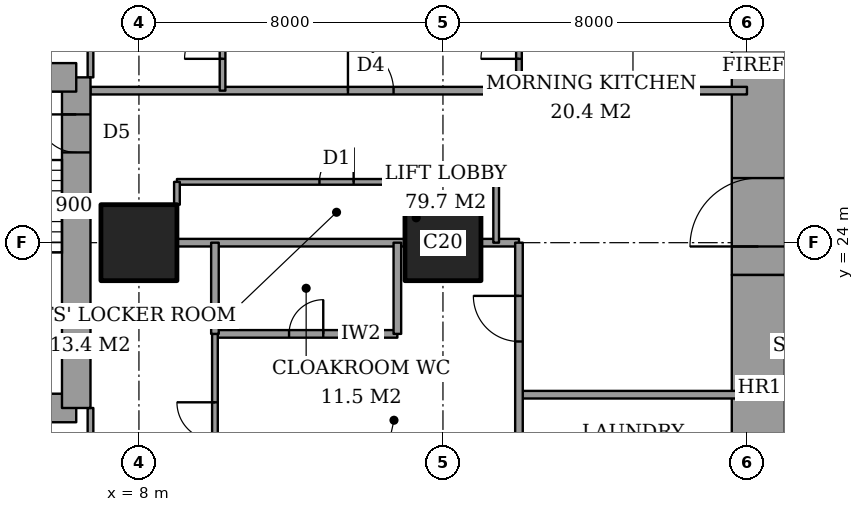
"""IFC4 building model, lengths in metres.
Left out: names, types, materials, properties, quantities, classifications, styles, units other than length and angle.
Written with IfcOpenShell. Run it as: python <this file> out.ifc"""

import sys

from ifc_helpers import new_model, si_unit, direction, frame, frame_2d, origin, origin_2d, place, context, subcontext, project, spatial, rectangle, extrude, element, fill, save


model = new_model("IFC4")
c1 = context("Model", 3, precision=1e-05, world=origin(), true_north=direction((0.0, 1.0)))
c2 = subcontext(c1, "Body", "Model", "MODEL_VIEW")
j1 = project(units=[si_unit("LENGTHUNIT", "METRE"), si_unit("PLANEANGLEUNIT", "RADIAN")], contexts=[c1])
p1 = place(None, origin())
s1 = spatial("IfcSite", under=j1, at=p1, CompositionType="ELEMENT")
p2 = place(p1, origin())
s2 = spatial("IfcBuilding", under=s1, at=p2, CompositionType="ELEMENT")
p3 = place(p2, frame((0.0, 0.0, 117.8)))
s3 = spatial("IfcBuildingStorey", under=s2, at=p3, CompositionType="ELEMENT", Elevation=117.8)
for number, where, z_axis, x_axis in (
    (1, (8.0, 24.0, 0.0), (0.0, 0.0, 1.0), (1.0, 0.0, 0.0)),
    (2, (16.0, 24.0, 0.0), (0.0, 0.0, 1.0), (1.0, 0.0, 0.0)),
):
    element("IfcColumn", number, at=place(p3, frame(where, z_axis=z_axis, x_axis=x_axis)), inside=s3, PredefinedType="COLUMN", context=c2, shape_type="SweptSolid", body=[
        extrude(rectangle(XDim=2.0, YDim=2.0, at=origin_2d()), origin(), (0.0, 0.0, 1.0), 3.6),
    ])
p4 = place(p3, frame((24.3, 13.0, 0.0), z_axis=(0.0, 0.0, 1.0), x_axis=(0.0, 1.0, 0.0)))
e3 = element("IfcWall", 3, at=p4, inside=s3, PredefinedType="SHEAR", context=c2, shape_type="SweptSolid", body=[
    extrude(rectangle(XDim=10.15, YDim=1.4, at=frame_2d((5.075, 0.0))), origin(), (0.0, 0.0, 1.0), 3.6),
])
p5 = place(p3, frame((24.3, 23.15, 0.0), z_axis=(0.0, 0.0, 1.0), x_axis=(0.0, 1.0, 0.0)))
e4 = element("IfcWall", 4, at=p5, inside=s3, PredefinedType="SHEAR", context=c2, shape_type="SweptSolid", body=[
    extrude(rectangle(XDim=11.85, YDim=1.4, at=frame_2d((5.925, 0.0))), origin(), (0.0, 0.0, 1.0), 3.6),
])
p6 = place(p5, frame((0.75, 0.0, 0.0)))
e5 = element("IfcOpeningElement", 5, at=p6, cuts=e4, PredefinedType="OPENING", context=c2, shape_type="SweptSolid", body=[
    extrude(rectangle(XDim=1.8, YDim=2.4, at=frame_2d((0.9, 1.2))), frame((0.0, 0.71, 0.0), z_axis=(0.0, -1.0, 0.0), x_axis=(1.0, 0.0, 0.0)), (0.0, 0.0, 1.0), 1.42),
])
p7 = place(p3, frame((1.9, 19.65, 0.0), z_axis=(0.0, 0.0, 1.0), x_axis=(1.0, 0.0, 0.0)))
e6 = element("IfcWall", 6, at=p7, inside=s3, PredefinedType="SHEAR", context=c2, shape_type="SweptSolid", body=[
    extrude(rectangle(XDim=4.45, YDim=0.75, at=frame_2d((2.225, 0.0))), origin(), (0.0, 0.0, 1.0), 3.6),
])
p8 = place(p3, frame((6.35, 19.65, 0.0), z_axis=(0.0, 0.0, 1.0), x_axis=(0.0, 1.0, 0.0)))
e7 = element("IfcWall", 7, at=p8, inside=s3, PredefinedType="SHEAR", context=c2, shape_type="SweptSolid", body=[
    extrude(rectangle(XDim=8.7, YDim=0.75, at=frame_2d((4.35, 0.0))), origin(), (0.0, 0.0, 1.0), 3.6),
])
p9 = place(p8, frame((6.725, 0.0, 0.0)))
e8 = element("IfcOpeningElement", 8, at=p9, cuts=e7, PredefinedType="OPENING", context=c2, shape_type="SweptSolid", body=[
    extrude(rectangle(XDim=1.0, YDim=2.1, at=frame_2d((0.5, 1.05))), frame((0.0, 0.385, 0.0), z_axis=(0.0, -1.0, 0.0), x_axis=(1.0, 0.0, 0.0)), (0.0, 0.0, 1.0), 0.77),
])
p10 = place(p3, frame((6.35, 28.35, 0.0), z_axis=(0.0, 0.0, 1.0), x_axis=(-1.0, 0.0, 0.0)))
e9 = element("IfcWall", 9, at=p10, inside=s3, PredefinedType="SHEAR", context=c2, shape_type="SweptSolid", body=[
    extrude(rectangle(XDim=4.45, YDim=0.75, at=frame_2d((2.225, 0.0))), origin(), (0.0, 0.0, 1.0), 3.6),
])
p11 = place(p3, frame((18.0, 20.0, 0.0), z_axis=(0.0, 0.0, 1.0), x_axis=(1.0, 0.0, 0.0)))
e10 = element("IfcWall", 10, at=p11, inside=s3, PredefinedType="PARTITIONING", context=c2, shape_type="SweptSolid", body=[
    extrude(rectangle(XDim=6.0, YDim=0.2, at=frame_2d((3.0, 0.0))), origin(), (0.0, 0.0, 1.0), 3.35),
])
p12 = place(p3, frame((10.0, 21.6, 0.0), z_axis=(0.0, 0.0, 1.0), x_axis=(1.0, 0.0, 0.0)))
e11 = element("IfcWall", 11, at=p12, inside=s3, PredefinedType="PARTITIONING", context=c2, shape_type="SweptSolid", body=[
    extrude(rectangle(XDim=4.8, YDim=0.2, at=frame_2d((2.4, 0.0))), origin(), (0.0, 0.0, 1.0), 3.35),
])
p13 = place(p12, frame((1.95, 0.0, 0.0)))
e12 = element("IfcOpeningElement", 12, at=p13, cuts=e11, PredefinedType="OPENING", context=c2, shape_type="SweptSolid", body=[
    extrude(rectangle(XDim=0.9, YDim=2.1, at=frame_2d((0.45, 1.05))), frame((0.0, 0.11, 0.0), z_axis=(0.0, -1.0, 0.0), x_axis=(1.0, 0.0, 0.0)), (0.0, 0.0, 1.0), 0.22),
])
p14 = place(p3, frame((9.0, 24.0, 0.0), z_axis=(0.0, 0.0, 1.0), x_axis=(1.0, 0.0, 0.0)))
e13 = element("IfcWall", 13, at=p14, inside=s3, PredefinedType="PARTITIONING", context=c2, shape_type="SweptSolid", body=[
    extrude(rectangle(XDim=6.0, YDim=0.2, at=frame_2d((3.0, 0.0))), origin(), (0.0, 0.0, 1.0), 3.35),
])
p15 = place(p3, frame((17.0, 24.0, 0.0), z_axis=(0.0, 0.0, 1.0), x_axis=(1.0, 0.0, 0.0)))
e14 = element("IfcWall", 14, at=p15, inside=s3, PredefinedType="PARTITIONING", context=c2, shape_type="SweptSolid", body=[
    extrude(rectangle(XDim=1.0, YDim=0.2, at=frame_2d((0.5, 0.0))), origin(), (0.0, 0.0, 1.0), 3.35),
])
p16 = place(p3, frame((9.0, 25.6, 0.0), z_axis=(0.0, 0.0, 1.0), x_axis=(1.0, 0.0, 0.0)))
e15 = element("IfcWall", 15, at=p16, inside=s3, PredefinedType="PARTITIONING", context=c2, shape_type="SweptSolid", body=[
    extrude(rectangle(XDim=8.4, YDim=0.15, at=frame_2d((4.2, 0.0))), origin(), (0.0, 0.0, 1.0), 3.35),
])
p17 = place(p16, frame((3.75, 0.0, 0.0)))
e16 = element("IfcOpeningElement", 16, at=p17, cuts=e15, PredefinedType="OPENING", context=c2, shape_type="SweptSolid", body=[
    extrude(rectangle(XDim=0.9, YDim=2.1, at=frame_2d((0.45, 1.05))), frame((0.0, 0.085, 0.0), z_axis=(0.0, -1.0, 0.0), x_axis=(1.0, 0.0, 0.0)), (0.0, 0.0, 1.0), 0.17),
])
p18 = place(p3, frame((6.725, 28.0, 0.0), z_axis=(0.0, 0.0, 1.0), x_axis=(1.0, 0.0, 0.0)))
e17 = element("IfcWall", 17, at=p18, inside=s3, PredefinedType="PARTITIONING", context=c2, shape_type="SweptSolid", body=[
    extrude(rectangle(XDim=17.275, YDim=0.2, at=frame_2d((8.637, 0.0))), origin(), (0.0, 0.0, 1.0), 3.35),
])
p19 = place(p18, frame((6.775, 0.0, 0.0)))
e18 = element("IfcOpeningElement", 18, at=p19, cuts=e17, PredefinedType="OPENING", context=c2, shape_type="SweptSolid", body=[
    extrude(rectangle(XDim=1.2, YDim=2.4, at=frame_2d((0.6, 1.2))), frame((0.0, 0.11, 0.0), z_axis=(0.0, -1.0, 0.0), x_axis=(1.0, 0.0, 0.0)), (0.0, 0.0, 1.0), 0.22),
])
p20 = place(p3, frame((6.725, 17.2, 0.0), z_axis=(0.0, 0.0, 1.0), x_axis=(0.0, 1.0, 0.0)))
e19 = element("IfcWall", 19, at=p20, inside=s3, PredefinedType="PARTITIONING", context=c2, shape_type="SweptSolid", body=[
    extrude(rectangle(XDim=2.45, YDim=0.15, at=frame_2d((1.225, 0.0))), origin(), (0.0, 0.0, 1.0), 3.35),
])
p21 = place(p20, frame((0.538, 0.0, 0.0)))
e20 = element("IfcOpeningElement", 20, at=p21, cuts=e19, PredefinedType="OPENING", context=c2, shape_type="SweptSolid", body=[
    extrude(rectangle(XDim=1.0, YDim=2.1, at=frame_2d((0.5, 1.05))), frame((0.0, 0.085, 0.0), z_axis=(0.0, -1.0, 0.0), x_axis=(1.0, 0.0, 0.0)), (0.0, 0.0, 1.0), 0.17),
])
p22 = place(p3, frame((6.725, 28.35, 0.0), z_axis=(0.0, 0.0, 1.0), x_axis=(0.0, 1.0, 0.0)))
e21 = element("IfcWall", 21, at=p22, inside=s3, PredefinedType="PARTITIONING", context=c2, shape_type="SweptSolid", body=[
    extrude(rectangle(XDim=2.45, YDim=0.15, at=frame_2d((1.225, 0.0))), origin(), (0.0, 0.0, 1.0), 3.35),
])
p23 = place(p22, frame((0.962, 0.0, 0.0)))
e22 = element("IfcOpeningElement", 22, at=p23, cuts=e21, PredefinedType="OPENING", context=c2, shape_type="SweptSolid", body=[
    extrude(rectangle(XDim=0.9, YDim=2.1, at=frame_2d((0.45, 1.05))), frame((0.0, 0.085, 0.0), z_axis=(0.0, -1.0, 0.0), x_axis=(1.0, 0.0, 0.0)), (0.0, 0.0, 1.0), 0.17),
])
p24 = place(p3, frame((9.0, 25.0, 0.0), z_axis=(0.0, 0.0, 1.0), x_axis=(0.0, 1.0, 0.0)))
e23 = element("IfcWall", 23, at=p24, inside=s3, PredefinedType="PARTITIONING", context=c2, shape_type="SweptSolid", body=[
    extrude(rectangle(XDim=0.6, YDim=0.15, at=frame_2d((0.3, 0.0))), origin(), (0.0, 0.0, 1.0), 3.35),
])
p25 = place(p3, frame((10.0, 21.6, 0.0), z_axis=(0.0, 0.0, 1.0), x_axis=(0.0, 1.0, 0.0)))
e24 = element("IfcWall", 24, at=p25, inside=s3, PredefinedType="PARTITIONING", context=c2, shape_type="SweptSolid", body=[
    extrude(rectangle(XDim=2.4, YDim=0.2, at=frame_2d((1.2, 0.0))), origin(), (0.0, 0.0, 1.0), 3.35),
])
p26 = place(p3, frame((10.0, 10.6, 0.0), z_axis=(0.0, 0.0, 1.0), x_axis=(0.0, 1.0, 0.0)))
e25 = element("IfcWall", 25, at=p26, inside=s3, PredefinedType="PARTITIONING", context=c2, shape_type="SweptSolid", body=[
    extrude(rectangle(XDim=11.0, YDim=0.15, at=frame_2d((5.5, 0.0))), origin(), (0.0, 0.0, 1.0), 3.35),
])
p27 = place(p26, frame((8.2, 0.0, 0.0)))
e26 = element("IfcOpeningElement", 26, at=p27, cuts=e25, PredefinedType="OPENING", context=c2, shape_type="SweptSolid", body=[
    extrude(rectangle(XDim=1.0, YDim=2.1, at=frame_2d((0.5, 1.05))), frame((0.0, 0.085, 0.0), z_axis=(0.0, -1.0, 0.0), x_axis=(1.0, 0.0, 0.0)), (0.0, 0.0, 1.0), 0.17),
])
p28 = place(p3, frame((10.2, 28.0, 0.0), z_axis=(0.0, 0.0, 1.0), x_axis=(0.0, 1.0, 0.0)))
e27 = element("IfcWall", 27, at=p28, inside=s3, PredefinedType="PARTITIONING", context=c2, shape_type="SweptSolid", body=[
    extrude(rectangle(XDim=9.4, YDim=0.15, at=frame_2d((4.7, 0.0))), origin(), (0.0, 0.0, 1.0), 3.35),
])
p29 = place(p28, frame((0.837, 0.0, 0.0)))
e28 = element("IfcOpeningElement", 28, at=p29, cuts=e27, PredefinedType="OPENING", context=c2, shape_type="SweptSolid", body=[
    extrude(rectangle(XDim=1.0, YDim=2.1, at=frame_2d((0.5, 1.05))), frame((0.0, 0.085, 0.0), z_axis=(0.0, -1.0, 0.0), x_axis=(1.0, 0.0, 0.0)), (0.0, 0.0, 1.0), 0.17),
])
p30 = place(p3, frame((14.8, 21.6, 0.0), z_axis=(0.0, 0.0, 1.0), x_axis=(0.0, 1.0, 0.0)))
e29 = element("IfcWall", 29, at=p30, inside=s3, PredefinedType="PARTITIONING", context=c2, shape_type="SweptSolid", body=[
    extrude(rectangle(XDim=2.4, YDim=0.2, at=frame_2d((1.2, 0.0))), origin(), (0.0, 0.0, 1.0), 3.35),
])
p31 = place(p3, frame((17.4, 24.0, 0.0), z_axis=(0.0, 0.0, 1.0), x_axis=(0.0, 1.0, 0.0)))
e30 = element("IfcWall", 30, at=p31, inside=s3, PredefinedType="PARTITIONING", context=c2, shape_type="SweptSolid", body=[
    extrude(rectangle(XDim=1.6, YDim=0.15, at=frame_2d((0.8, 0.0))), origin(), (0.0, 0.0, 1.0), 3.35),
])
p32 = place(p3, frame((18.0, 17.0, 0.0), z_axis=(0.0, 0.0, 1.0), x_axis=(0.0, 1.0, 0.0)))
e31 = element("IfcWall", 31, at=p32, inside=s3, PredefinedType="PARTITIONING", context=c2, shape_type="SweptSolid", body=[
    extrude(rectangle(XDim=7.0, YDim=0.2, at=frame_2d((3.5, 0.0))), origin(), (0.0, 0.0, 1.0), 3.35),
])
p33 = place(p32, frame((4.4, 0.0, 0.0)))
e32 = element("IfcOpeningElement", 32, at=p33, cuts=e31, PredefinedType="OPENING", context=c2, shape_type="SweptSolid", body=[
    extrude(rectangle(XDim=1.2, YDim=2.4, at=frame_2d((0.6, 1.2))), frame((0.0, 0.11, 0.0), z_axis=(0.0, -1.0, 0.0), x_axis=(1.0, 0.0, 0.0)), (0.0, 0.0, 1.0), 0.22),
])
p34 = place(p32, frame((1.05, 0.0, 0.0)))
e33 = element("IfcOpeningElement", 33, at=p34, cuts=e31, PredefinedType="OPENING", context=c2, shape_type="SweptSolid", body=[
    extrude(rectangle(XDim=0.9, YDim=2.1, at=frame_2d((0.45, 1.05))), frame((0.0, 0.11, 0.0), z_axis=(0.0, -1.0, 0.0), x_axis=(1.0, 0.0, 0.0)), (0.0, 0.0, 1.0), 0.22),
])
p35 = place(p3, frame((18.0, 28.0, 0.0), z_axis=(0.0, 0.0, 1.0), x_axis=(0.0, 1.0, 0.0)))
e34 = element("IfcWall", 34, at=p35, inside=s3, PredefinedType="PARTITIONING", context=c2, shape_type="SweptSolid", body=[
    extrude(rectangle(XDim=9.4, YDim=0.15, at=frame_2d((4.7, 0.0))), origin(), (0.0, 0.0, 1.0), 3.35),
])
p36 = place(p35, frame((0.837, 0.0, 0.0)))
e35 = element("IfcOpeningElement", 35, at=p36, cuts=e34, PredefinedType="OPENING", context=c2, shape_type="SweptSolid", body=[
    extrude(rectangle(XDim=1.0, YDim=2.1, at=frame_2d((0.5, 1.05))), frame((0.0, 0.085, 0.0), z_axis=(0.0, -1.0, 0.0), x_axis=(1.0, 0.0, 0.0)), (0.0, 0.0, 1.0), 0.17),
])
p37 = place(p27, origin())
e36 = element("IfcDoor", 36, at=p37, inside=s3, OperationType="SINGLE_SWING_LEFT", PredefinedType="DOOR", context=c2, shape_type="SweptSolid", body=[
    extrude(rectangle(XDim=1.0, YDim=2.1, at=frame_2d((0.5, 1.05))), frame((0.0, 0.025, 0.0), z_axis=(0.0, -1.0, 0.0), x_axis=(1.0, 0.0, 0.0)), (0.0, 0.0, 1.0), 0.05),
])
fill(e26, e36)
p38 = place(p13, origin())
e37 = element("IfcDoor", 37, at=p38, inside=s3, OperationType="SINGLE_SWING_LEFT", PredefinedType="DOOR", context=c2, shape_type="SweptSolid", body=[
    extrude(rectangle(XDim=0.9, YDim=2.1, at=frame_2d((0.45, 1.05))), frame((0.0, 0.025, 0.0), z_axis=(0.0, -1.0, 0.0), x_axis=(1.0, 0.0, 0.0)), (0.0, 0.0, 1.0), 0.05),
])
fill(e12, e37)
p39 = place(p33, origin())
e38 = element("IfcDoor", 38, at=p39, inside=s3, OperationType="SINGLE_SWING_LEFT", PredefinedType="DOOR", context=c2, shape_type="SweptSolid", body=[
    extrude(rectangle(XDim=1.2, YDim=2.4, at=frame_2d((0.6, 1.2))), frame((0.0, 0.025, 0.0), z_axis=(0.0, -1.0, 0.0), x_axis=(1.0, 0.0, 0.0)), (0.0, 0.0, 1.0), 0.05),
])
fill(e32, e38)
p40 = place(p29, origin())
e39 = element("IfcDoor", 39, at=p40, inside=s3, OperationType="SINGLE_SWING_RIGHT", PredefinedType="DOOR", context=c2, shape_type="SweptSolid", body=[
    extrude(rectangle(XDim=1.0, YDim=2.1, at=frame_2d((0.5, 1.05))), frame((0.0, 0.025, 0.0), z_axis=(0.0, -1.0, 0.0), x_axis=(1.0, 0.0, 0.0)), (0.0, 0.0, 1.0), 0.05),
])
fill(e28, e39)
p41 = place(p19, origin())
e40 = element("IfcDoor", 40, at=p41, inside=s3, OperationType="SINGLE_SWING_RIGHT", PredefinedType="DOOR", context=c2, shape_type="SweptSolid", body=[
    extrude(rectangle(XDim=1.2, YDim=2.4, at=frame_2d((0.6, 1.2))), frame((0.0, 0.025, 0.0), z_axis=(0.0, -1.0, 0.0), x_axis=(1.0, 0.0, 0.0)), (0.0, 0.0, 1.0), 0.05),
])
fill(e18, e40)
p42 = place(p36, origin())
e41 = element("IfcDoor", 41, at=p42, inside=s3, OperationType="SINGLE_SWING_RIGHT", PredefinedType="DOOR", context=c2, shape_type="SweptSolid", body=[
    extrude(rectangle(XDim=1.0, YDim=2.1, at=frame_2d((0.5, 1.05))), frame((0.0, 0.025, 0.0), z_axis=(0.0, -1.0, 0.0), x_axis=(1.0, 0.0, 0.0)), (0.0, 0.0, 1.0), 0.05),
])
fill(e35, e41)
p43 = place(p17, origin())
e42 = element("IfcDoor", 42, at=p43, inside=s3, OperationType="SINGLE_SWING_LEFT", PredefinedType="DOOR", context=c2, shape_type="SweptSolid", body=[
    extrude(rectangle(XDim=0.9, YDim=2.1, at=frame_2d((0.45, 1.05))), frame((0.0, 0.025, 0.0), z_axis=(0.0, -1.0, 0.0), x_axis=(1.0, 0.0, 0.0)), (0.0, 0.0, 1.0), 0.05),
])
fill(e16, e42)
p44 = place(p6, origin())
e43 = element("IfcDoor", 43, at=p44, inside=s3, OperationType="DOUBLE_DOOR_DOUBLE_SWING", PredefinedType="DOOR", context=c2, shape_type="SweptSolid", body=[
    extrude(rectangle(XDim=1.8, YDim=2.4, at=frame_2d((0.9, 1.2))), frame((0.0, 0.025, 0.0), z_axis=(0.0, -1.0, 0.0), x_axis=(1.0, 0.0, 0.0)), (0.0, 0.0, 1.0), 0.05),
])
fill(e5, e43)
p45 = place(p9, origin())
e44 = element("IfcDoor", 44, at=p45, inside=s3, OperationType="SINGLE_SWING_LEFT", PredefinedType="DOOR", context=c2, shape_type="SweptSolid", body=[
    extrude(rectangle(XDim=1.0, YDim=2.1, at=frame_2d((0.5, 1.05))), frame((0.0, 0.025, 0.0), z_axis=(0.0, -1.0, 0.0), x_axis=(1.0, 0.0, 0.0)), (0.0, 0.0, 1.0), 0.05),
])
fill(e8, e44)
save(model, sys.argv[1])
